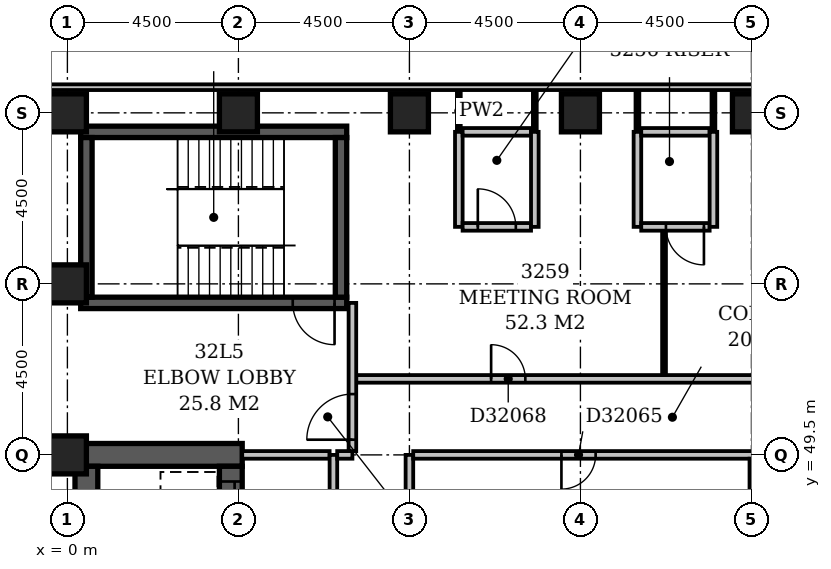
"""IFC4 building model, lengths in metres.
Left out: names, types, materials, properties, quantities, classifications, styles, units other than length and angle.
Written with IfcOpenShell. Run it as: python <this file> out.ifc"""

import sys

from ifc_helpers import new_model, si_unit, direction, frame, frame_2d, origin, origin_2d, place, context, subcontext, project, spatial, rectangle, extrude, element, fill, save


model = new_model("IFC4")
c1 = context("Model", 3, precision=1e-05, world=origin(), true_north=direction((0.0, 1.0)))
c2 = subcontext(c1, "Body", "Model", "MODEL_VIEW")
j1 = project(units=[si_unit("LENGTHUNIT", "METRE"), si_unit("PLANEANGLEUNIT", "RADIAN")], contexts=[c1])
p1 = place(None, origin())
s1 = spatial("IfcSite", under=j1, at=p1, CompositionType="ELEMENT")
p2 = place(p1, origin())
s2 = spatial("IfcBuilding", under=s1, at=p2, CompositionType="ELEMENT")
p3 = place(p2, frame((0.0, 0.0, 130.4)))
s3 = spatial("IfcBuildingStorey", under=s2, at=p3, CompositionType="ELEMENT", Elevation=130.4)
p4 = place(p3, frame((0.2, 49.5, -0.3), z_axis=(0.0, 0.0, 1.0), x_axis=(1.0, 0.0, 0.0)))
e1 = element("IfcWall", 1, at=p4, inside=s3, PredefinedType="SHEAR", context=c2, shape_type="SweptSolid", body=[
    extrude(rectangle(XDim=4.4, YDim=0.6, at=frame_2d((2.2, 0.0))), origin(), (0.0, 0.0, 1.0), 3.6),
])
p5 = place(p3, frame((0.35, 53.5, -0.3), z_axis=(0.0, 0.0, 1.0), x_axis=(1.0, 0.0, 0.0)))
e2 = element("IfcWall", 2, at=p5, inside=s3, PredefinedType="SHEAR", context=c2, shape_type="SweptSolid", body=[
    extrude(rectangle(XDim=7.0, YDim=0.3, at=frame_2d((3.5, 0.0))), origin(), (0.0, 0.0, 1.0), 3.6),
])
p6 = place(p5, frame((5.58, 0.0, 0.3)))
e3 = element("IfcOpeningElement", 3, at=p6, cuts=e2, PredefinedType="OPENING", context=c2, shape_type="SweptSolid", body=[
    extrude(rectangle(XDim=1.1, YDim=2.1, at=frame_2d((0.55, 1.05))), frame((0.0, 0.162, 0.0), z_axis=(0.0, -1.0, 0.0), x_axis=(1.0, 0.0, 0.0)), (0.0, 0.0, 1.0), 0.324),
])
p7 = place(p3, frame((0.35, 58.0, -0.3), z_axis=(0.0, 0.0, 1.0), x_axis=(1.0, 0.0, 0.0)))
e4 = element("IfcWall", 4, at=p7, inside=s3, PredefinedType="SHEAR", context=c2, shape_type="SweptSolid", body=[
    extrude(rectangle(XDim=7.0, YDim=0.3, at=frame_2d((3.5, 0.0))), origin(), (0.0, 0.0, 1.0), 3.6),
])
p8 = place(p3, frame((0.5, 27.15, -0.3), z_axis=(0.0, 0.0, 1.0), x_axis=(0.0, 1.0, 0.0)))
e5 = element("IfcWall", 5, at=p8, inside=s3, PredefinedType="SHEAR", context=c2, shape_type="SweptSolid", body=[
    extrude(rectangle(XDim=22.05, YDim=0.6, at=frame_2d((11.025, 0.0))), origin(), (0.0, 0.0, 1.0), 3.6),
])
p9 = place(p3, frame((0.5, 53.65, -0.3), z_axis=(0.0, 0.0, 1.0), x_axis=(0.0, 1.0, 0.0)))
e6 = element("IfcWall", 6, at=p9, inside=s3, PredefinedType="SHEAR", context=c2, shape_type="SweptSolid", body=[
    extrude(rectangle(XDim=4.2, YDim=0.3, at=frame_2d((2.1, 0.0))), origin(), (0.0, 0.0, 1.0), 3.6),
])
p10 = place(p3, frame((4.3, 27.15, -0.3), z_axis=(0.0, 0.0, 1.0), x_axis=(0.0, 1.0, 0.0)))
e7 = element("IfcWall", 7, at=p10, inside=s3, PredefinedType="SHEAR", context=c2, shape_type="SweptSolid", body=[
    extrude(rectangle(XDim=22.05, YDim=0.6, at=frame_2d((11.025, 0.0))), origin(), (0.0, 0.0, 1.0), 3.6),
])
p11 = place(p10, frame((3.05, 0.0, 0.3)))
e8 = element("IfcOpeningElement", 8, at=p11, cuts=e7, PredefinedType="OPENING", context=c2, shape_type="SweptSolid", body=[
    extrude(rectangle(XDim=1.1, YDim=2.1, at=frame_2d((0.55, 1.05))), frame((0.0, 0.312, 0.0), z_axis=(0.0, -1.0, 0.0), x_axis=(1.0, 0.0, 0.0)), (0.0, 0.0, 1.0), 0.624),
])
p12 = place(p10, frame((0.55, 0.0, 0.3)))
e9 = element("IfcOpeningElement", 9, at=p12, cuts=e7, PredefinedType="OPENING", context=c2, shape_type="SweptSolid", body=[
    extrude(rectangle(XDim=1.1, YDim=2.1, at=frame_2d((0.55, 1.05))), frame((0.0, 0.312, 0.0), z_axis=(0.0, -1.0, 0.0), x_axis=(1.0, 0.0, 0.0)), (0.0, 0.0, 1.0), 0.624),
])
p13 = place(p10, frame((20.55, 0.0, 0.3)))
e10 = element("IfcOpeningElement", 10, at=p13, cuts=e7, PredefinedType="OPENING", context=c2, shape_type="SweptSolid", body=[
    extrude(rectangle(XDim=1.1, YDim=2.1, at=frame_2d((0.55, 1.05))), frame((0.0, 0.312, 0.0), z_axis=(0.0, -1.0, 0.0), x_axis=(1.0, 0.0, 0.0)), (0.0, 0.0, 1.0), 0.624),
])
p14 = place(p10, frame((18.05, 0.0, 0.3)))
e11 = element("IfcOpeningElement", 11, at=p14, cuts=e7, PredefinedType="OPENING", context=c2, shape_type="SweptSolid", body=[
    extrude(rectangle(XDim=1.1, YDim=2.1, at=frame_2d((0.55, 1.05))), frame((0.0, 0.312, 0.0), z_axis=(0.0, -1.0, 0.0), x_axis=(1.0, 0.0, 0.0)), (0.0, 0.0, 1.0), 0.624),
])
p15 = place(p10, frame((15.55, 0.0, 0.3)))
e12 = element("IfcOpeningElement", 12, at=p15, cuts=e7, PredefinedType="OPENING", context=c2, shape_type="SweptSolid", body=[
    extrude(rectangle(XDim=1.1, YDim=2.1, at=frame_2d((0.55, 1.05))), frame((0.0, 0.312, 0.0), z_axis=(0.0, -1.0, 0.0), x_axis=(1.0, 0.0, 0.0)), (0.0, 0.0, 1.0), 0.624),
])
p16 = place(p10, frame((13.05, 0.0, 0.3)))
e13 = element("IfcOpeningElement", 13, at=p16, cuts=e7, PredefinedType="OPENING", context=c2, shape_type="SweptSolid", body=[
    extrude(rectangle(XDim=1.1, YDim=2.1, at=frame_2d((0.55, 1.05))), frame((0.0, 0.312, 0.0), z_axis=(0.0, -1.0, 0.0), x_axis=(1.0, 0.0, 0.0)), (0.0, 0.0, 1.0), 0.624),
])
p17 = place(p10, frame((10.55, 0.0, 0.3)))
e14 = element("IfcOpeningElement", 14, at=p17, cuts=e7, PredefinedType="OPENING", context=c2, shape_type="SweptSolid", body=[
    extrude(rectangle(XDim=1.1, YDim=2.1, at=frame_2d((0.55, 1.05))), frame((0.0, 0.312, 0.0), z_axis=(0.0, -1.0, 0.0), x_axis=(1.0, 0.0, 0.0)), (0.0, 0.0, 1.0), 0.624),
])
p18 = place(p10, frame((8.05, 0.0, 0.3)))
e15 = element("IfcOpeningElement", 15, at=p18, cuts=e7, PredefinedType="OPENING", context=c2, shape_type="SweptSolid", body=[
    extrude(rectangle(XDim=1.1, YDim=2.1, at=frame_2d((0.55, 1.05))), frame((0.0, 0.312, 0.0), z_axis=(0.0, -1.0, 0.0), x_axis=(1.0, 0.0, 0.0)), (0.0, 0.0, 1.0), 0.624),
])
p19 = place(p10, frame((5.55, 0.0, 0.3)))
e16 = element("IfcOpeningElement", 16, at=p19, cuts=e7, PredefinedType="OPENING", context=c2, shape_type="SweptSolid", body=[
    extrude(rectangle(XDim=1.1, YDim=2.1, at=frame_2d((0.55, 1.05))), frame((0.0, 0.312, 0.0), z_axis=(0.0, -1.0, 0.0), x_axis=(1.0, 0.0, 0.0)), (0.0, 0.0, 1.0), 0.624),
])
p20 = place(p3, frame((7.2, 53.65, -0.3), z_axis=(0.0, 0.0, 1.0), x_axis=(0.0, 1.0, 0.0)))
e17 = element("IfcWall", 17, at=p20, inside=s3, PredefinedType="SHEAR", context=c2, shape_type="SweptSolid", body=[
    extrude(rectangle(XDim=4.2, YDim=0.3, at=frame_2d((2.1, 0.0))), origin(), (0.0, 0.0, 1.0), 3.6),
])
for number, where, z_axis, x_axis in (
    (18, (0.0, 49.5, -0.3), (0.0, 0.0, 1.0), (1.0, 0.0, 0.0)),
    (19, (0.0, 54.0, -0.3), (0.0, 0.0, 1.0), (1.0, 0.0, 0.0)),
    (20, (0.0, 58.5, -0.3), (0.0, 0.0, 1.0), (1.0, 0.0, 0.0)),
    (21, (4.5, 58.5, -0.3), (0.0, 0.0, 1.0), (1.0, 0.0, 0.0)),
    (22, (9.0, 58.5, -0.3), (0.0, 0.0, 1.0), (1.0, 0.0, 0.0)),
    (23, (13.5, 58.5, -0.3), (0.0, 0.0, 1.0), (1.0, 0.0, 0.0)),
    (24, (18.0, 58.5, -0.3), (0.0, 0.0, 1.0), (1.0, 0.0, 0.0)),
):
    element("IfcColumn", number, at=place(p3, frame(where, z_axis=z_axis, x_axis=x_axis)), inside=s3, PredefinedType="COLUMN", context=c2, shape_type="SweptSolid", body=[
        extrude(rectangle(XDim=1.0, YDim=1.0, at=origin_2d()), origin(), (0.0, 0.0, 1.0), 3.6),
    ])
p21 = place(p3, frame((68.1, 59.175, 0.0), z_axis=(0.0, 0.0, 1.0), x_axis=(-1.0, 0.0, 0.0)))
e25 = element("IfcWall", 25, at=p21, inside=s3, PredefinedType="STANDARD", context=c2, shape_type="SweptSolid", body=[
    extrude(rectangle(XDim=68.85, YDim=0.15, at=frame_2d((34.425, 0.0))), origin(), (0.0, 0.0, 1.0), 2.7),
])
p22 = place(p3, frame((7.0, 34.6, 0.0), z_axis=(0.0, 0.0, 1.0), x_axis=(0.0, 1.0, 0.0)))
e26 = element("IfcWall", 26, at=p22, inside=s3, PredefinedType="PARTITIONING", context=c2, shape_type="SweptSolid", body=[
    extrude(rectangle(XDim=14.9, YDim=0.2, at=frame_2d((7.45, 0.0))), origin(), (0.0, 0.0, 1.0), 3.3),
])
p23 = place(p22, frame((2.8, 0.0, 0.0)))
e27 = element("IfcOpeningElement", 27, at=p23, cuts=e26, PredefinedType="OPENING", context=c2, shape_type="SweptSolid", body=[
    extrude(rectangle(XDim=1.2, YDim=2.1, at=frame_2d((0.6, 1.05))), frame((0.0, 0.112, 0.0), z_axis=(0.0, -1.0, 0.0), x_axis=(1.0, 0.0, 0.0)), (0.0, 0.0, 1.0), 0.224),
])
p24 = place(p22, frame((9.8, 0.0, 0.0)))
e28 = element("IfcOpeningElement", 28, at=p24, cuts=e26, PredefinedType="OPENING", context=c2, shape_type="SweptSolid", body=[
    extrude(rectangle(XDim=1.2, YDim=2.1, at=frame_2d((0.6, 1.05))), frame((0.0, 0.112, 0.0), z_axis=(0.0, -1.0, 0.0), x_axis=(1.0, 0.0, 0.0)), (0.0, 0.0, 1.0), 0.224),
])
p25 = place(p3, frame((4.6, 49.5, 0.0), z_axis=(0.0, 0.0, 1.0), x_axis=(1.0, 0.0, 0.0)))
e29 = element("IfcWall", 29, at=p25, inside=s3, PredefinedType="PARTITIONING", context=c2, shape_type="SweptSolid", body=[
    extrude(rectangle(XDim=2.3, YDim=0.2, at=frame_2d((1.15, 0.0))), origin(), (0.0, 0.0, 1.0), 3.3),
])
p26 = place(p3, frame((7.1, 49.5, 0.0), z_axis=(0.0, 0.0, 1.0), x_axis=(1.0, 0.0, 0.0)))
e30 = element("IfcWall", 30, at=p26, inside=s3, PredefinedType="PARTITIONING", context=c2, shape_type="SweptSolid", body=[
    extrude(rectangle(XDim=0.4, YDim=0.2, at=frame_2d((0.2, 0.0))), origin(), (0.0, 0.0, 1.0), 3.3),
])
p27 = place(p3, frame((7.5, 49.6, 0.0), z_axis=(0.0, 0.0, 1.0), x_axis=(0.0, 1.0, 0.0)))
e31 = element("IfcWall", 31, at=p27, inside=s3, PredefinedType="PARTITIONING", context=c2, shape_type="SweptSolid", body=[
    extrude(rectangle(XDim=3.9, YDim=0.2, at=frame_2d((1.95, 0.0))), origin(), (0.0, 0.0, 1.0), 3.3),
])
p28 = place(p27, frame((0.3, 0.0, 0.0)))
e32 = element("IfcOpeningElement", 32, at=p28, cuts=e31, PredefinedType="OPENING", context=c2, shape_type="SweptSolid", body=[
    extrude(rectangle(XDim=1.2, YDim=2.1, at=frame_2d((0.6, 1.05))), frame((0.0, 0.112, 0.0), z_axis=(0.0, -1.0, 0.0), x_axis=(1.0, 0.0, 0.0)), (0.0, 0.0, 1.0), 0.224),
])
p29 = place(p3, frame((9.0, 34.75, 0.0), z_axis=(0.0, 0.0, 1.0), x_axis=(0.0, 1.0, 0.0)))
e33 = element("IfcWall", 33, at=p29, inside=s3, PredefinedType="PARTITIONING", context=c2, shape_type="SweptSolid", body=[
    extrude(rectangle(XDim=14.75, YDim=0.2, at=frame_2d((7.375, 0.0))), origin(), (0.0, 0.0, 1.0), 3.3),
])
p30 = place(p29, frame((5.25, 0.0, 0.0)))
e34 = element("IfcOpeningElement", 34, at=p30, cuts=e33, PredefinedType="OPENING", context=c2, shape_type="SweptSolid", body=[
    extrude(rectangle(XDim=0.9, YDim=2.1, at=frame_2d((0.45, 1.05))), frame((0.0, 0.112, 0.0), z_axis=(0.0, -1.0, 0.0), x_axis=(1.0, 0.0, 0.0)), (0.0, 0.0, 1.0), 0.224),
])
p31 = place(p3, frame((18.0, 45.0, 0.0), z_axis=(0.0, 0.0, 1.0), x_axis=(0.0, 1.0, 0.0)))
e35 = element("IfcWall", 35, at=p31, inside=s3, PredefinedType="PARTITIONING", context=c2, shape_type="SweptSolid", body=[
    extrude(rectangle(XDim=4.4, YDim=0.1, at=frame_2d((2.2, 0.0))), origin(), (0.0, 0.0, 1.0), 3.3),
])
p32 = place(p3, frame((9.1, 49.5, 0.0), z_axis=(0.0, 0.0, 1.0), x_axis=(1.0, 0.0, 0.0)))
e36 = element("IfcWall", 36, at=p32, inside=s3, PredefinedType="PARTITIONING", context=c2, shape_type="SweptSolid", body=[
    extrude(rectangle(XDim=28.05, YDim=0.2, at=frame_2d((14.025, 0.0))), origin(), (0.0, 0.0, 1.0), 3.3),
])
p33 = place(p32, frame((20.0, 0.0, 0.0)))
e37 = element("IfcOpeningElement", 37, at=p33, cuts=e36, PredefinedType="OPENING", context=c2, shape_type="SweptSolid", body=[
    extrude(rectangle(XDim=1.0, YDim=2.1, at=frame_2d((0.5, 1.05))), frame((0.0, 0.112, 0.0), z_axis=(0.0, -1.0, 0.0), x_axis=(1.0, 0.0, 0.0)), (0.0, 0.0, 1.0), 0.224),
])
p34 = place(p32, frame((3.9, 0.0, 0.0)))
e38 = element("IfcOpeningElement", 38, at=p34, cuts=e36, PredefinedType="OPENING", context=c2, shape_type="SweptSolid", body=[
    extrude(rectangle(XDim=0.9, YDim=2.1, at=frame_2d((0.45, 1.05))), frame((0.0, 0.112, 0.0), z_axis=(0.0, -1.0, 0.0), x_axis=(1.0, 0.0, 0.0)), (0.0, 0.0, 1.0), 0.224),
])
p35 = place(p3, frame((7.6, 51.5, 0.0), z_axis=(0.0, 0.0, 1.0), x_axis=(1.0, 0.0, 0.0)))
e39 = element("IfcWall", 39, at=p35, inside=s3, PredefinedType="PARTITIONING", context=c2, shape_type="SweptSolid", body=[
    extrude(rectangle(XDim=15.3, YDim=0.2, at=frame_2d((7.65, 0.0))), origin(), (0.0, 0.0, 1.0), 3.3),
])
p36 = place(p35, frame((3.55, 0.0, 0.0)))
e40 = element("IfcOpeningElement", 40, at=p36, cuts=e39, PredefinedType="OPENING", context=c2, shape_type="SweptSolid", body=[
    extrude(rectangle(XDim=0.9, YDim=2.1, at=frame_2d((0.45, 1.05))), frame((0.0, 0.112, 0.0), z_axis=(0.0, -1.0, 0.0), x_axis=(1.0, 0.0, 0.0)), (0.0, 0.0, 1.0), 0.224),
])
p37 = place(p35, frame((11.3, 0.0, 0.0)))
e41 = element("IfcOpeningElement", 41, at=p37, cuts=e39, PredefinedType="OPENING", context=c2, shape_type="SweptSolid", body=[
    extrude(rectangle(XDim=0.9, YDim=2.1, at=frame_2d((0.45, 1.05))), frame((0.0, 0.112, 0.0), z_axis=(0.0, -1.0, 0.0), x_axis=(1.0, 0.0, 0.0)), (0.0, 0.0, 1.0), 0.224),
])
p38 = place(p3, frame((15.7, 51.6, 0.0), z_axis=(0.0, 0.0, 1.0), x_axis=(0.0, 1.0, 0.0)))
e42 = element("IfcWall", 42, at=p38, inside=s3, PredefinedType="PARTITIONING", context=c2, shape_type="SweptSolid", body=[
    extrude(rectangle(XDim=3.8, YDim=0.1, at=frame_2d((1.9, 0.0))), origin(), (0.0, 0.0, 1.0), 3.3),
])
p39 = place(p3, frame((10.3, 55.5, 0.0), z_axis=(0.0, 0.0, 1.0), x_axis=(0.0, 1.0, 0.0)))
e43 = element("IfcWall", 43, at=p39, inside=s3, PredefinedType="PARTITIONING", context=c2, shape_type="SweptSolid", body=[
    extrude(rectangle(XDim=2.5, YDim=0.2, at=frame_2d((1.25, 0.0))), origin(), (0.0, 0.0, 1.0), 3.3),
])
p40 = place(p3, frame((10.4, 55.5, 0.0), z_axis=(0.0, 0.0, 1.0), x_axis=(1.0, 0.0, 0.0)))
e44 = element("IfcWall", 44, at=p40, inside=s3, PredefinedType="PARTITIONING", context=c2, shape_type="SweptSolid", body=[
    extrude(rectangle(XDim=1.8, YDim=0.2, at=frame_2d((0.9, 0.0))), origin(), (0.0, 0.0, 1.0), 3.3),
])
p41 = place(p40, frame((0.4, 0.0, 0.0)))
e45 = element("IfcOpeningElement", 45, at=p41, cuts=e44, PredefinedType="OPENING", context=c2, shape_type="SweptSolid", body=[
    extrude(rectangle(XDim=1.0, YDim=2.1, at=frame_2d((0.5, 1.05))), frame((0.0, 0.112, 0.0), z_axis=(0.0, -1.0, 0.0), x_axis=(1.0, 0.0, 0.0)), (0.0, 0.0, 1.0), 0.224),
])
for number, where, z_axis, x_axis in (
    (46, (12.3, 55.5, 0.0), (0.0, 0.0, 1.0), (0.0, 1.0, 0.0)),
    (47, (15.0, 55.5, 0.0), (0.0, 0.0, 1.0), (0.0, 1.0, 0.0)),
):
    element("IfcWall", number, at=place(p3, frame(where, z_axis=z_axis, x_axis=x_axis)), inside=s3, PredefinedType="PARTITIONING", context=c2, shape_type="SweptSolid", body=[
        extrude(rectangle(XDim=2.5, YDim=0.2, at=frame_2d((1.25, 0.0))), origin(), (0.0, 0.0, 1.0), 3.3),
    ])
p42 = place(p3, frame((15.1, 55.5, 0.0), z_axis=(0.0, 0.0, 1.0), x_axis=(1.0, 0.0, 0.0)))
e48 = element("IfcWall", 48, at=p42, inside=s3, PredefinedType="PARTITIONING", context=c2, shape_type="SweptSolid", body=[
    extrude(rectangle(XDim=1.8, YDim=0.2, at=frame_2d((0.9, 0.0))), origin(), (0.0, 0.0, 1.0), 3.3),
])
p43 = place(p42, frame((0.65, 0.0, 0.0)))
e49 = element("IfcOpeningElement", 49, at=p43, cuts=e48, PredefinedType="OPENING", context=c2, shape_type="SweptSolid", body=[
    extrude(rectangle(XDim=1.0, YDim=2.1, at=frame_2d((0.5, 1.05))), frame((0.0, 0.112, 0.0), z_axis=(0.0, -1.0, 0.0), x_axis=(1.0, 0.0, 0.0)), (0.0, 0.0, 1.0), 0.224),
])
p44 = place(p3, frame((17.0, 55.5, 0.0), z_axis=(0.0, 0.0, 1.0), x_axis=(0.0, 1.0, 0.0)))
e50 = element("IfcWall", 50, at=p44, inside=s3, PredefinedType="PARTITIONING", context=c2, shape_type="SweptSolid", body=[
    extrude(rectangle(XDim=2.5, YDim=0.2, at=frame_2d((1.25, 0.0))), origin(), (0.0, 0.0, 1.0), 3.3),
])
p45 = place(p3, frame((10.3, 58.0, 0.0), z_axis=(0.0, 0.0, 1.0), x_axis=(0.0, 1.0, 0.0)))
e51 = element("IfcWall", 51, at=p45, inside=s3, PredefinedType="PARTITIONING", context=c2, shape_type="SweptSolid", body=[
    extrude(rectangle(XDim=1.1, YDim=0.1, at=frame_2d((0.55, 0.0))), origin(), (0.0, 0.0, 1.0), 3.3),
])
p46 = place(p3, frame((10.4, 58.0, 0.0), z_axis=(0.0, 0.0, 1.0), x_axis=(1.0, 0.0, 0.0)))
e52 = element("IfcWall", 52, at=p46, inside=s3, PredefinedType="PARTITIONING", context=c2, shape_type="SweptSolid", body=[
    extrude(rectangle(XDim=1.8, YDim=0.2, at=frame_2d((0.9, 0.0))), origin(), (0.0, 0.0, 1.0), 3.3),
])
for number, where, z_axis, x_axis in (
    (53, (12.3, 58.0, 0.0), (0.0, 0.0, 1.0), (0.0, 1.0, 0.0)),
    (54, (15.0, 58.0, 0.0), (0.0, 0.0, 1.0), (0.0, 1.0, 0.0)),
):
    element("IfcWall", number, at=place(p3, frame(where, z_axis=z_axis, x_axis=x_axis)), inside=s3, PredefinedType="PARTITIONING", context=c2, shape_type="SweptSolid", body=[
        extrude(rectangle(XDim=1.1, YDim=0.1, at=frame_2d((0.55, 0.0))), origin(), (0.0, 0.0, 1.0), 3.3),
    ])
p47 = place(p3, frame((15.1, 58.0, 0.0), z_axis=(0.0, 0.0, 1.0), x_axis=(1.0, 0.0, 0.0)))
e55 = element("IfcWall", 55, at=p47, inside=s3, PredefinedType="PARTITIONING", context=c2, shape_type="SweptSolid", body=[
    extrude(rectangle(XDim=1.8, YDim=0.2, at=frame_2d((0.9, 0.0))), origin(), (0.0, 0.0, 1.0), 3.3),
])
p48 = place(p3, frame((17.0, 58.0, 0.0), z_axis=(0.0, 0.0, 1.0), x_axis=(0.0, 1.0, 0.0)))
e56 = element("IfcWall", 56, at=p48, inside=s3, PredefinedType="PARTITIONING", context=c2, shape_type="SweptSolid", body=[
    extrude(rectangle(XDim=1.1, YDim=0.1, at=frame_2d((0.55, 0.0))), origin(), (0.0, 0.0, 1.0), 3.3),
])
p49 = place(p28, origin())
e57 = element("IfcDoor", 57, at=p49, inside=s3, OperationType="SINGLE_SWING_LEFT", PredefinedType="DOOR", context=c2, shape_type="SweptSolid", body=[
    extrude(rectangle(XDim=1.2, YDim=2.1, at=frame_2d((0.6, 1.05))), frame((0.0, 0.025, 0.0), z_axis=(0.0, -1.0, 0.0), x_axis=(1.0, 0.0, 0.0)), (0.0, 0.0, 1.0), 0.05),
])
fill(e32, e57)
p50 = place(p13, origin())
e58 = element("IfcDoor", 58, at=p50, inside=s3, OperationType="SLIDING_TO_LEFT", PredefinedType="DOOR", context=c2, shape_type="SweptSolid", body=[
    extrude(rectangle(XDim=1.1, YDim=2.1, at=frame_2d((0.55, 1.05))), frame((0.0, 0.025, 0.0), z_axis=(0.0, -1.0, 0.0), x_axis=(1.0, 0.0, 0.0)), (0.0, 0.0, 1.0), 0.05),
])
fill(e10, e58)
p51 = place(p6, origin())
e59 = element("IfcDoor", 59, at=p51, inside=s3, OperationType="SINGLE_SWING_RIGHT", PredefinedType="DOOR", context=c2, shape_type="SweptSolid", body=[
    extrude(rectangle(XDim=1.1, YDim=2.1, at=frame_2d((0.55, 1.05))), frame((0.0, 0.025, 0.0), z_axis=(0.0, -1.0, 0.0), x_axis=(1.0, 0.0, 0.0)), (0.0, 0.0, 1.0), 0.05),
])
fill(e3, e59)
p52 = place(p34, frame((0.9, 0.0, 0.0), z_axis=(0.0, 0.0, 1.0), x_axis=(-1.0, 0.0, 0.0)))
e60 = element("IfcDoor", 60, at=p52, inside=s3, OperationType="SINGLE_SWING_RIGHT", PredefinedType="DOOR", context=c2, shape_type="SweptSolid", body=[
    extrude(rectangle(XDim=0.9, YDim=2.1, at=frame_2d((0.45, 1.05))), frame((0.0, 0.025, 0.0), z_axis=(0.0, -1.0, 0.0), x_axis=(1.0, 0.0, 0.0)), (0.0, 0.0, 1.0), 0.05),
])
fill(e38, e60)
p53 = place(p36, origin())
e61 = element("IfcDoor", 61, at=p53, inside=s3, OperationType="SINGLE_SWING_LEFT", PredefinedType="DOOR", context=c2, shape_type="SweptSolid", body=[
    extrude(rectangle(XDim=0.9, YDim=2.1, at=frame_2d((0.45, 1.05))), frame((0.0, 0.025, 0.0), z_axis=(0.0, -1.0, 0.0), x_axis=(1.0, 0.0, 0.0)), (0.0, 0.0, 1.0), 0.05),
])
fill(e40, e61)
p54 = place(p41, origin())
e62 = element("IfcDoor", 62, at=p54, inside=s3, OperationType="SINGLE_SWING_LEFT", PredefinedType="DOOR", context=c2, shape_type="SweptSolid", body=[
    extrude(rectangle(XDim=1.0, YDim=2.1, at=frame_2d((0.5, 1.05))), frame((0.0, 0.025, 0.0), z_axis=(0.0, -1.0, 0.0), x_axis=(1.0, 0.0, 0.0)), (0.0, 0.0, 1.0), 0.05),
])
fill(e45, e62)
p55 = place(p43, origin())
e63 = element("IfcDoor", 63, at=p55, inside=s3, OperationType="SINGLE_SWING_RIGHT", PredefinedType="DOOR", context=c2, shape_type="SweptSolid", body=[
    extrude(rectangle(XDim=1.0, YDim=2.1, at=frame_2d((0.5, 1.05))), frame((0.0, 0.025, 0.0), z_axis=(0.0, -1.0, 0.0), x_axis=(1.0, 0.0, 0.0)), (0.0, 0.0, 1.0), 0.05),
])
fill(e49, e63)
save(model, sys.argv[1])
